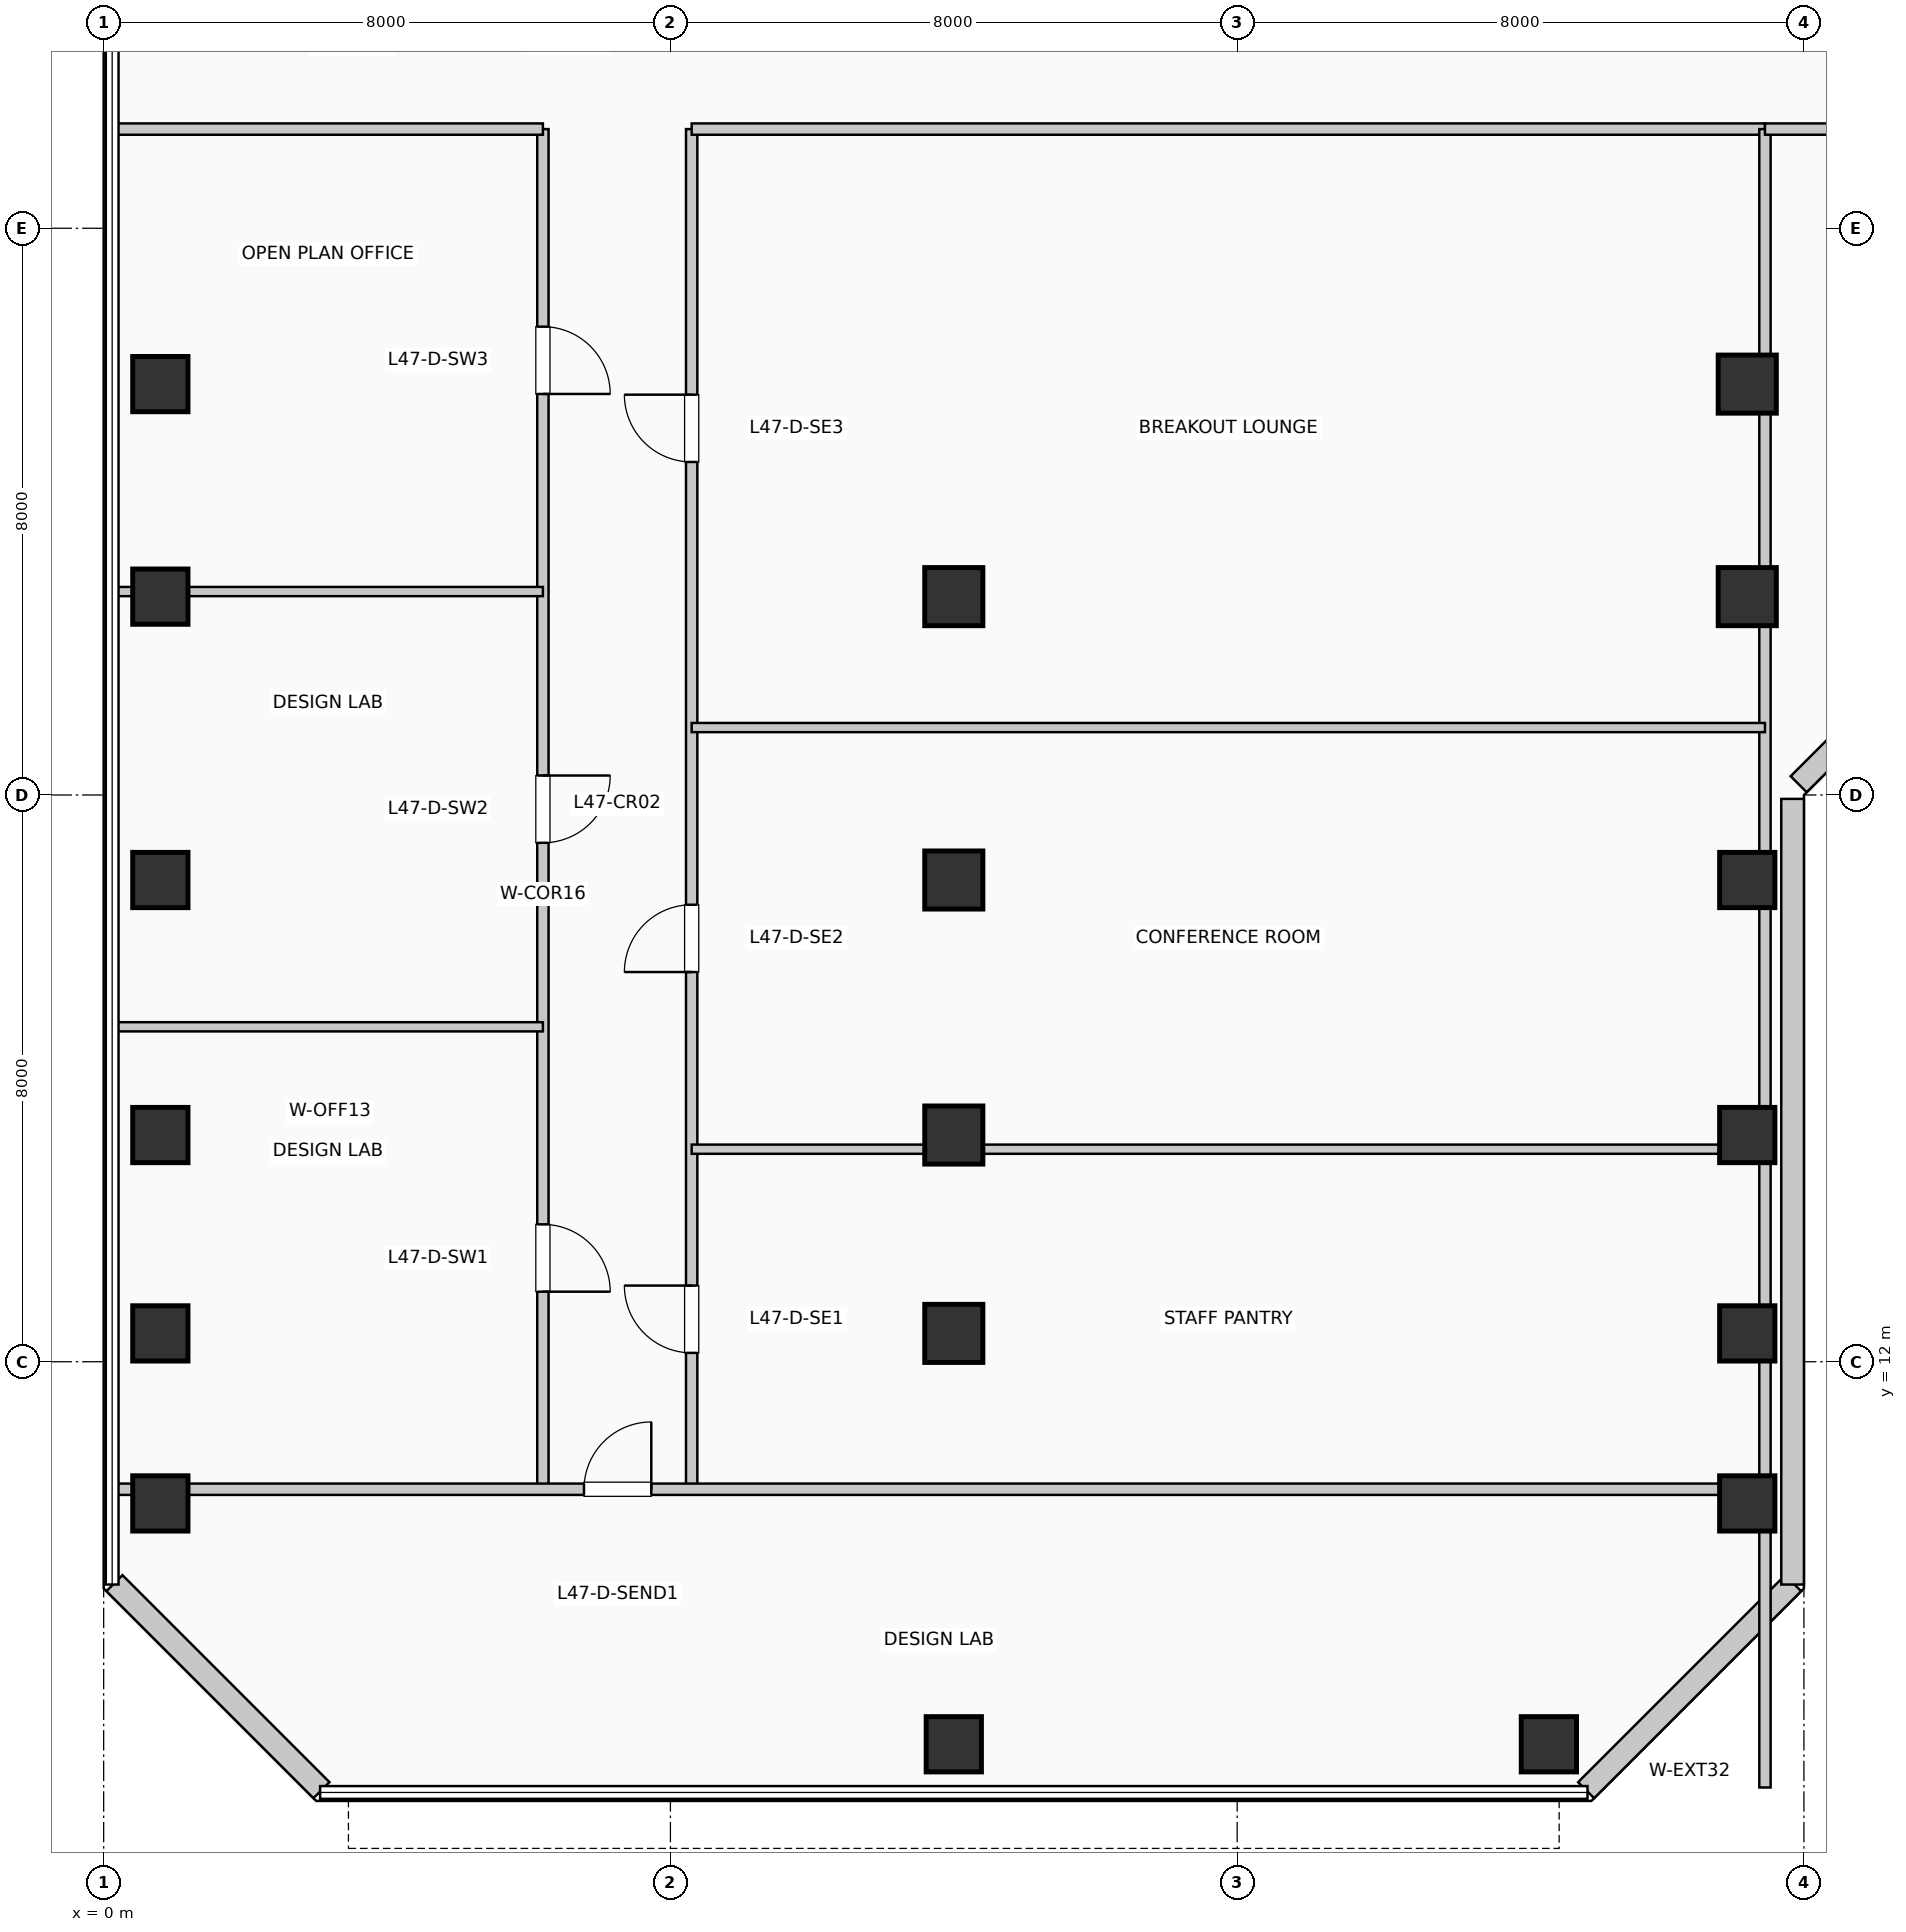
"""IFC4 building model, lengths in metres.
Left out: names, types, materials, properties, quantities, classifications, styles, units other than length and angle.
Written with IfcOpenShell. Run it as: python <this file> out.ifc"""

import sys

from ifc_helpers import new_model, si_unit, direction, frame, frame_2d, origin, origin_2d, place, context, subcontext, project, spatial, rectangle, extrude, element, fill, save


model = new_model("IFC4")
c1 = context("Model", 3, precision=1e-05, world=origin(), true_north=direction((0.0, 1.0)))
c2 = subcontext(c1, "Body", "Model", "MODEL_VIEW")
j1 = project(units=[si_unit("LENGTHUNIT", "METRE"), si_unit("PLANEANGLEUNIT", "RADIAN")], contexts=[c1])
p1 = place(None, origin())
s1 = spatial("IfcSite", under=j1, at=p1, CompositionType="ELEMENT")
p2 = place(p1, origin())
s2 = spatial("IfcBuilding", under=s1, at=p2, CompositionType="ELEMENT")
p3 = place(p2, frame((0.0, 0.0, 195.36)))
s3 = spatial("IfcBuildingStorey", under=s2, at=p3, CompositionType="ELEMENT", Elevation=195.36)
for number, where, z_axis, x_axis in (
    (1, (0.8, 10.0, 0.0), (0.0, 0.0, 1.0), (1.0, 0.0, 0.0)),
    (2, (0.8, 12.4, 0.0), (0.0, 0.0, 1.0), (1.0, 0.0, 0.0)),
    (3, (0.8, 15.2, 0.0), (0.0, 0.0, 1.0), (1.0, 0.0, 0.0)),
    (4, (0.8, 18.8, 0.0), (0.0, 0.0, 1.0), (1.0, 0.0, 0.0)),
    (5, (0.8, 22.8, 0.0), (0.0, 0.0, 1.0), (1.0, 0.0, 0.0)),
    (6, (0.8, 25.8, 0.0), (0.0, 0.0, 1.0), (1.0, 0.0, 0.0)),
    (7, (12.0, 6.6, 0.0), (0.0, 0.0, 1.0), (1.0, 0.0, 0.0)),
):
    element("IfcColumn", number, at=place(p3, frame(where, z_axis=z_axis, x_axis=x_axis)), inside=s3, PredefinedType="COLUMN", context=c2, shape_type="SweptSolid", body=[
        extrude(rectangle(XDim=0.78, YDim=0.78, at=origin_2d()), origin(), (0.0, 0.0, 1.0), 3.96),
    ])
for number, where, z_axis, x_axis in (
    (8, (12.0, 12.4, 0.0), (0.0, 0.0, 1.0), (1.0, 0.0, 0.0)),
    (9, (12.0, 15.2, 0.0), (0.0, 0.0, 1.0), (1.0, 0.0, 0.0)),
    (10, (12.0, 18.8, 0.0), (0.0, 0.0, 1.0), (1.0, 0.0, 0.0)),
    (11, (12.0, 22.8, 0.0), (0.0, 0.0, 1.0), (1.0, 0.0, 0.0)),
):
    element("IfcColumn", number, at=place(p3, frame(where, z_axis=z_axis, x_axis=x_axis)), inside=s3, PredefinedType="COLUMN", context=c2, shape_type="SweptSolid", body=[
        extrude(rectangle(XDim=0.82, YDim=0.82, at=origin_2d()), origin(), (0.0, 0.0, 1.0), 3.96),
    ])
for number, where, z_axis, x_axis in (
    (12, (20.4, 6.6, 0.0), (0.0, 0.0, 1.0), (1.0, 0.0, 0.0)),
    (13, (23.2, 10.0, 0.0), (0.0, 0.0, 1.0), (1.0, 0.0, 0.0)),
    (14, (23.2, 12.4, 0.0), (0.0, 0.0, 1.0), (1.0, 0.0, 0.0)),
    (15, (23.2, 15.2, 0.0), (0.0, 0.0, 1.0), (1.0, 0.0, 0.0)),
    (16, (23.2, 18.8, 0.0), (0.0, 0.0, 1.0), (1.0, 0.0, 0.0)),
):
    element("IfcColumn", number, at=place(p3, frame(where, z_axis=z_axis, x_axis=x_axis)), inside=s3, PredefinedType="COLUMN", context=c2, shape_type="SweptSolid", body=[
        extrude(rectangle(XDim=0.78, YDim=0.78, at=origin_2d()), origin(), (0.0, 0.0, 1.0), 3.96),
    ])
for number, where, z_axis, x_axis in (
    (17, (23.2, 22.8, 0.0), (0.0, 0.0, 1.0), (1.0, 0.0, 0.0)),
    (18, (23.2, 25.8, 0.0), (0.0, 0.0, 1.0), (1.0, 0.0, 0.0)),
):
    element("IfcColumn", number, at=place(p3, frame(where, z_axis=z_axis, x_axis=x_axis)), inside=s3, PredefinedType="COLUMN", context=c2, shape_type="SweptSolid", body=[
        extrude(rectangle(XDim=0.82, YDim=0.82, at=origin_2d()), origin(), (0.0, 0.0, 1.0), 3.96),
    ])
p4 = place(p3, frame((20.926, 5.952, 0.0), z_axis=(0.0, 0.0, 1.0), x_axis=(0.707077242712, 0.707136318428, 0.0)))
e19 = element("IfcWall", 19, at=p4, inside=s3, PredefinedType="SOLIDWALL", context=c2, shape_type="SweptSolid", body=[
    extrude(rectangle(XDim=4.133, YDim=0.32, at=frame_2d((2.066, 0.0))), origin(), (0.0, 0.0, 1.0), 3.71),
])
p5 = place(p3, frame((23.84, 8.855, 0.0), z_axis=(0.0, 0.0, 1.0), x_axis=(0.0, 1.0, 0.0)))
e20 = element("IfcWall", 20, at=p5, inside=s3, PredefinedType="SOLIDWALL", context=c2, shape_type="SweptSolid", body=[
    extrude(rectangle(XDim=11.09, YDim=0.32, at=frame_2d((5.545, 0.0))), origin(), (0.0, 0.0, 1.0), 3.71),
])
p6 = place(p3, frame((23.926, 20.152, 0.0), z_axis=(0.0, 0.0, 1.0), x_axis=(0.707106781187, 0.707106781187, 0.0)))
e21 = element("IfcWall", 21, at=p6, inside=s3, PredefinedType="SOLIDWALL", context=c2, shape_type="SweptSolid", body=[
    extrude(rectangle(XDim=2.718, YDim=0.32, at=frame_2d((1.359, 0.0))), origin(), (0.0, 0.0, 1.0), 3.71),
])
p7 = place(p3, frame((0.152, 8.874, 0.0), z_axis=(0.0, 0.0, 1.0), x_axis=(0.707077242712, -0.707136318428, 0.0)))
e22 = element("IfcWall", 22, at=p7, inside=s3, PredefinedType="SOLIDWALL", context=c2, shape_type="SweptSolid", body=[
    extrude(rectangle(XDim=4.133, YDim=0.32, at=frame_2d((2.066, 0.0))), origin(), (0.0, 0.0, 1.0), 3.71),
])
p8 = place(p3, frame((6.2, 10.2, 0.0), z_axis=(0.0, 0.0, 1.0), x_axis=(0.0, 1.0, 0.0)))
e23 = element("IfcWall", 23, at=p8, inside=s3, PredefinedType="PARTITIONING", context=c2, shape_type="SweptSolid", body=[
    extrude(rectangle(XDim=19.2, YDim=0.16, at=frame_2d((9.6, 0.0))), origin(), (0.0, 0.0, 1.0), 3.71),
])
p9 = place(p8, frame((3.739, 0.0, 0.0), z_axis=(0.0, 0.0, 1.0), x_axis=(-1.0, 0.0, 0.0)))
e24 = element("IfcOpeningElement", 24, at=p9, cuts=e23, PredefinedType="OPENING", context=c2, shape_type="SweptSolid", body=[
    extrude(rectangle(XDim=0.95, YDim=2.15, at=frame_2d((0.475, 1.075))), frame((0.0, 0.09, 0.0), z_axis=(0.0, -1.0, 0.0), x_axis=(1.0, 0.0, 0.0)), (0.0, 0.0, 1.0), 0.18),
])
p10 = place(p8, frame((10.075, 0.0, 0.0), z_axis=(0.0, 0.0, 1.0), x_axis=(-1.0, 0.0, 0.0)))
e25 = element("IfcOpeningElement", 25, at=p10, cuts=e23, PredefinedType="OPENING", context=c2, shape_type="SweptSolid", body=[
    extrude(rectangle(XDim=0.95, YDim=2.15, at=frame_2d((0.475, 1.075))), frame((0.0, 0.09, 0.0), z_axis=(0.0, -1.0, 0.0), x_axis=(1.0, 0.0, 0.0)), (0.0, 0.0, 1.0), 0.18),
])
p11 = place(p8, frame((16.411, 0.0, 0.0), z_axis=(0.0, 0.0, 1.0), x_axis=(-1.0, 0.0, 0.0)))
e26 = element("IfcOpeningElement", 26, at=p11, cuts=e23, PredefinedType="OPENING", context=c2, shape_type="SweptSolid", body=[
    extrude(rectangle(XDim=0.95, YDim=2.15, at=frame_2d((0.475, 1.075))), frame((0.0, 0.09, 0.0), z_axis=(0.0, -1.0, 0.0), x_axis=(1.0, 0.0, 0.0)), (0.0, 0.0, 1.0), 0.18),
])
p12 = place(p3, frame((8.3, 10.2, 0.0), z_axis=(0.0, 0.0, 1.0), x_axis=(0.0, 1.0, 0.0)))
e27 = element("IfcWall", 27, at=p12, inside=s3, PredefinedType="PARTITIONING", context=c2, shape_type="SweptSolid", body=[
    extrude(rectangle(XDim=19.2, YDim=0.16, at=frame_2d((9.6, 0.0))), origin(), (0.0, 0.0, 1.0), 3.71),
])
p13 = place(p12, frame((1.925, 0.0, 0.0)))
e28 = element("IfcOpeningElement", 28, at=p13, cuts=e27, PredefinedType="OPENING", context=c2, shape_type="SweptSolid", body=[
    extrude(rectangle(XDim=0.95, YDim=2.15, at=frame_2d((0.475, 1.075))), frame((0.0, 0.09, 0.0), z_axis=(0.0, -1.0, 0.0), x_axis=(1.0, 0.0, 0.0)), (0.0, 0.0, 1.0), 0.18),
])
p14 = place(p12, frame((7.301, 0.0, 0.0)))
e29 = element("IfcOpeningElement", 29, at=p14, cuts=e27, PredefinedType="OPENING", context=c2, shape_type="SweptSolid", body=[
    extrude(rectangle(XDim=0.95, YDim=2.15, at=frame_2d((0.475, 1.075))), frame((0.0, 0.09, 0.0), z_axis=(0.0, -1.0, 0.0), x_axis=(1.0, 0.0, 0.0)), (0.0, 0.0, 1.0), 0.18),
])
p15 = place(p12, frame((14.501, 0.0, 0.0)))
e30 = element("IfcOpeningElement", 30, at=p15, cuts=e27, PredefinedType="OPENING", context=c2, shape_type="SweptSolid", body=[
    extrude(rectangle(XDim=0.95, YDim=2.15, at=frame_2d((0.475, 1.075))), frame((0.0, 0.09, 0.0), z_axis=(0.0, -1.0, 0.0), x_axis=(1.0, 0.0, 0.0)), (0.0, 0.0, 1.0), 0.18),
])
p16 = place(p3, frame((0.19, 10.2, 0.0), z_axis=(0.0, 0.0, 1.0), x_axis=(1.0, 0.0, 0.0)))
e31 = element("IfcWall", 31, at=p16, inside=s3, PredefinedType="PARTITIONING", context=c2, shape_type="SweptSolid", body=[
    extrude(rectangle(XDim=23.26, YDim=0.16, at=frame_2d((11.63, 0.0))), origin(), (0.0, 0.0, 1.0), 3.095),
])
p17 = place(p16, frame((6.59, 0.0, 0.0)))
e32 = element("IfcOpeningElement", 32, at=p17, cuts=e31, PredefinedType="OPENING", context=c2, shape_type="SweptSolid", body=[
    extrude(rectangle(XDim=0.95, YDim=2.15, at=frame_2d((0.475, 1.075))), frame((0.0, 0.09, 0.0), z_axis=(0.0, -1.0, 0.0), x_axis=(1.0, 0.0, 0.0)), (0.0, 0.0, 1.0), 0.18),
])
p18 = place(p3, frame((0.19, 29.4, 0.0), z_axis=(0.0, 0.0, 1.0), x_axis=(1.0, 0.0, 0.0)))
e33 = element("IfcWall", 33, at=p18, inside=s3, PredefinedType="PARTITIONING", context=c2, shape_type="SweptSolid", body=[
    extrude(rectangle(XDim=6.01, YDim=0.16, at=frame_2d((3.005, 0.0))), origin(), (0.0, 0.0, 1.0), 3.365),
])
p19 = place(p3, frame((8.3, 29.4, 0.0), z_axis=(0.0, 0.0, 1.0), x_axis=(1.0, 0.0, 0.0)))
e34 = element("IfcWall", 34, at=p19, inside=s3, PredefinedType="PARTITIONING", context=c2, shape_type="SweptSolid", body=[
    extrude(rectangle(XDim=15.15, YDim=0.16, at=frame_2d((7.575, 0.0))), origin(), (0.0, 0.0, 1.0), 3.365),
])
p20 = place(p3, frame((23.45, 5.99, 0.0), z_axis=(0.0, 0.0, 1.0), x_axis=(0.0, 1.0, 0.0)))
e35 = element("IfcWall", 35, at=p20, inside=s3, PredefinedType="PARTITIONING", context=c2, shape_type="SweptSolid", body=[
    extrude(rectangle(XDim=23.41, YDim=0.16, at=frame_2d((11.705, 0.0))), origin(), (0.0, 0.0, 1.0), 3.095),
])
p21 = place(p3, frame((0.19, 16.728, 0.0), z_axis=(0.0, 0.0, 1.0), x_axis=(1.0, 0.0, 0.0)))
e36 = element("IfcWall", 36, at=p21, inside=s3, PredefinedType="PARTITIONING", context=c2, shape_type="SweptSolid", body=[
    extrude(rectangle(XDim=6.01, YDim=0.13, at=frame_2d((3.005, 0.0))), origin(), (0.0, 0.0, 1.0), 3.71),
])
p22 = place(p3, frame((0.19, 22.872, 0.0), z_axis=(0.0, 0.0, 1.0), x_axis=(1.0, 0.0, 0.0)))
e37 = element("IfcWall", 37, at=p22, inside=s3, PredefinedType="PARTITIONING", context=c2, shape_type="SweptSolid", body=[
    extrude(rectangle(XDim=6.01, YDim=0.13, at=frame_2d((3.005, 0.0))), origin(), (0.0, 0.0, 1.0), 3.095),
])
p23 = place(p3, frame((8.3, 15.0, 0.0), z_axis=(0.0, 0.0, 1.0), x_axis=(1.0, 0.0, 0.0)))
e38 = element("IfcWall", 38, at=p23, inside=s3, PredefinedType="PARTITIONING", context=c2, shape_type="SweptSolid", body=[
    extrude(rectangle(XDim=15.15, YDim=0.13, at=frame_2d((7.575, 0.0))), origin(), (0.0, 0.0, 1.0), 3.095),
])
p24 = place(p3, frame((8.3, 20.952, 0.0), z_axis=(0.0, 0.0, 1.0), x_axis=(1.0, 0.0, 0.0)))
e39 = element("IfcWall", 39, at=p24, inside=s3, PredefinedType="PARTITIONING", context=c2, shape_type="SweptSolid", body=[
    extrude(rectangle(XDim=15.15, YDim=0.13, at=frame_2d((7.575, 0.0))), origin(), (0.0, 0.0, 1.0), 3.71),
])
p25 = place(p3, frame((23.45, 29.4, 0.0), z_axis=(0.0, 0.0, 1.0), x_axis=(1.0, 0.0, 0.0)))
e40 = element("IfcWall", 40, at=p25, inside=s3, PredefinedType="PARTITIONING", context=c2, shape_type="SweptSolid", body=[
    extrude(rectangle(XDim=26.56, YDim=0.16, at=frame_2d((13.28, 0.0))), origin(), (0.0, 0.0, 1.0), 3.365),
])
p26 = place(p25, frame((3.928, 0.0, 0.0), z_axis=(0.0, 0.0, 1.0), x_axis=(-1.0, 0.0, 0.0)))
e41 = element("IfcOpeningElement", 41, at=p26, cuts=e40, PredefinedType="OPENING", context=c2, shape_type="SweptSolid", body=[
    extrude(rectangle(XDim=0.95, YDim=2.15, at=frame_2d((0.475, 1.075))), frame((0.0, 0.09, 0.0), z_axis=(0.0, -1.0, 0.0), x_axis=(1.0, 0.0, 0.0)), (0.0, 0.0, 1.0), 0.18),
])
p27 = place(p25, frame((11.365, 0.0, 0.0), z_axis=(0.0, 0.0, 1.0), x_axis=(-1.0, 0.0, 0.0)))
e42 = element("IfcOpeningElement", 42, at=p27, cuts=e40, PredefinedType="OPENING", context=c2, shape_type="SweptSolid", body=[
    extrude(rectangle(XDim=0.95, YDim=2.15, at=frame_2d((0.475, 1.075))), frame((0.0, 0.09, 0.0), z_axis=(0.0, -1.0, 0.0), x_axis=(1.0, 0.0, 0.0)), (0.0, 0.0, 1.0), 0.18),
])
p28 = place(p25, frame((18.801, 0.0, 0.0), z_axis=(0.0, 0.0, 1.0), x_axis=(-1.0, 0.0, 0.0)))
e43 = element("IfcOpeningElement", 43, at=p28, cuts=e40, PredefinedType="OPENING", context=c2, shape_type="SweptSolid", body=[
    extrude(rectangle(XDim=0.95, YDim=2.15, at=frame_2d((0.475, 1.075))), frame((0.0, 0.09, 0.0), z_axis=(0.0, -1.0, 0.0), x_axis=(1.0, 0.0, 0.0)), (0.0, 0.0, 1.0), 0.18),
])
p29 = place(p25, frame((24.645, 0.0, 0.0), z_axis=(0.0, 0.0, 1.0), x_axis=(-1.0, 0.0, 0.0)))
e44 = element("IfcOpeningElement", 44, at=p29, cuts=e40, PredefinedType="OPENING", context=c2, shape_type="SweptSolid", body=[
    extrude(rectangle(XDim=0.95, YDim=2.15, at=frame_2d((0.475, 1.075))), frame((0.0, 0.09, 0.0), z_axis=(0.0, -1.0, 0.0), x_axis=(1.0, 0.0, 0.0)), (0.0, 0.0, 1.0), 0.18),
])
p30 = place(p17, origin())
e45 = element("IfcDoor", 45, at=p30, inside=s3, OperationType="SINGLE_SWING_RIGHT", PredefinedType="DOOR", context=c2, shape_type="SweptSolid", body=[
    extrude(rectangle(XDim=0.95, YDim=2.15, at=frame_2d((0.475, 1.075))), frame((0.0, 0.025, 0.0), z_axis=(0.0, -1.0, 0.0), x_axis=(1.0, 0.0, 0.0)), (0.0, 0.0, 1.0), 0.05),
])
fill(e32, e45)
p31 = place(p9, origin())
e46 = element("IfcDoor", 46, at=p31, inside=s3, OperationType="SINGLE_SWING_LEFT", PredefinedType="DOOR", context=c2, shape_type="SweptSolid", body=[
    extrude(rectangle(XDim=0.95, YDim=2.15, at=frame_2d((0.475, 1.075))), frame((0.0, 0.025, 0.0), z_axis=(0.0, -1.0, 0.0), x_axis=(1.0, 0.0, 0.0)), (0.0, 0.0, 1.0), 0.05),
])
fill(e24, e46)
p32 = place(p10, origin())
e47 = element("IfcDoor", 47, at=p32, inside=s3, OperationType="SINGLE_SWING_RIGHT", PredefinedType="DOOR", context=c2, shape_type="SweptSolid", body=[
    extrude(rectangle(XDim=0.95, YDim=2.15, at=frame_2d((0.475, 1.075))), frame((0.0, 0.025, 0.0), z_axis=(0.0, -1.0, 0.0), x_axis=(1.0, 0.0, 0.0)), (0.0, 0.0, 1.0), 0.05),
])
fill(e25, e47)
p33 = place(p11, origin())
e48 = element("IfcDoor", 48, at=p33, inside=s3, OperationType="SINGLE_SWING_LEFT", PredefinedType="DOOR", context=c2, shape_type="SweptSolid", body=[
    extrude(rectangle(XDim=0.95, YDim=2.15, at=frame_2d((0.475, 1.075))), frame((0.0, 0.025, 0.0), z_axis=(0.0, -1.0, 0.0), x_axis=(1.0, 0.0, 0.0)), (0.0, 0.0, 1.0), 0.05),
])
fill(e26, e48)
p34 = place(p13, origin())
e49 = element("IfcDoor", 49, at=p34, inside=s3, OperationType="SINGLE_SWING_RIGHT", PredefinedType="DOOR", context=c2, shape_type="SweptSolid", body=[
    extrude(rectangle(XDim=0.95, YDim=2.15, at=frame_2d((0.475, 1.075))), frame((0.0, 0.025, 0.0), z_axis=(0.0, -1.0, 0.0), x_axis=(1.0, 0.0, 0.0)), (0.0, 0.0, 1.0), 0.05),
])
fill(e28, e49)
p35 = place(p14, origin())
e50 = element("IfcDoor", 50, at=p35, inside=s3, OperationType="SINGLE_SWING_LEFT", PredefinedType="DOOR", context=c2, shape_type="SweptSolid", body=[
    extrude(rectangle(XDim=0.95, YDim=2.15, at=frame_2d((0.475, 1.075))), frame((0.0, 0.025, 0.0), z_axis=(0.0, -1.0, 0.0), x_axis=(1.0, 0.0, 0.0)), (0.0, 0.0, 1.0), 0.05),
])
fill(e29, e50)
p36 = place(p15, origin())
e51 = element("IfcDoor", 51, at=p36, inside=s3, OperationType="SINGLE_SWING_RIGHT", PredefinedType="DOOR", context=c2, shape_type="SweptSolid", body=[
    extrude(rectangle(XDim=0.95, YDim=2.15, at=frame_2d((0.475, 1.075))), frame((0.0, 0.025, 0.0), z_axis=(0.0, -1.0, 0.0), x_axis=(1.0, 0.0, 0.0)), (0.0, 0.0, 1.0), 0.05),
])
fill(e30, e51)
save(model, sys.argv[1])
